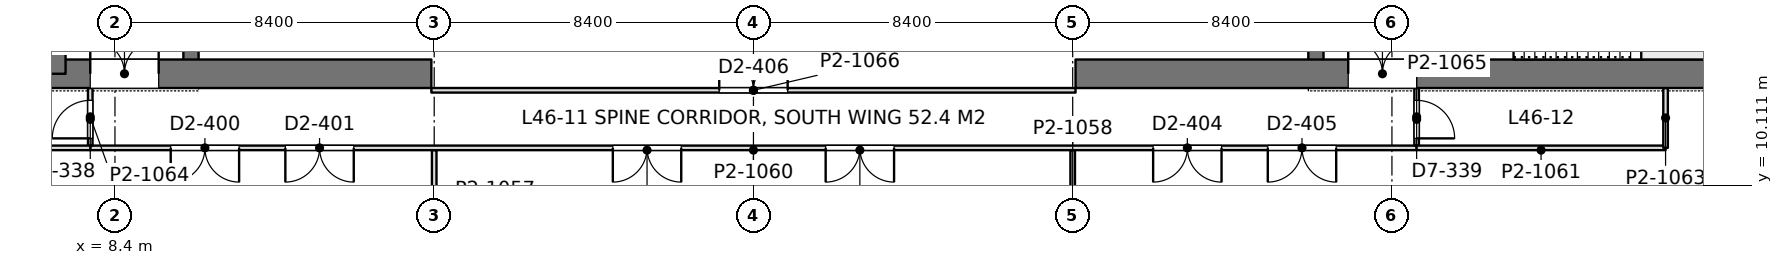
"""IFC4 building model, lengths in metres.
Left out: names, types, materials, properties, quantities, classifications, styles, units other than length and angle.
Written with IfcOpenShell. Run it as: python <this file> out.ifc"""

import sys

from ifc_helpers import new_model, si_unit, direction, frame, frame_2d, origin, place, context, subcontext, project, spatial, rectangle, extrude, element, fill, save


model = new_model("IFC4")
c1 = context("Model", 3, precision=1e-05, world=origin(), true_north=direction((0.0, 1.0)))
c2 = subcontext(c1, "Body", "Model", "MODEL_VIEW")
j1 = project(units=[si_unit("LENGTHUNIT", "METRE"), si_unit("PLANEANGLEUNIT", "RADIAN")], contexts=[c1])
p1 = place(None, origin())
s1 = spatial("IfcSite", under=j1, at=p1, CompositionType="ELEMENT")
p2 = place(p1, origin())
s2 = spatial("IfcBuilding", under=s1, at=p2, CompositionType="ELEMENT")
p3 = place(p2, frame((0.0, 0.0, 202.8)))
s3 = spatial("IfcBuildingStorey", under=s2, at=p3, CompositionType="ELEMENT", Elevation=202.8)
p4 = place(p3, frame((-1.125, 13.05, 0.0), z_axis=(0.0, 0.0, 1.0), x_axis=(1.0, 0.0, 0.0)))
e1 = element("IfcWall", 1, at=p4, inside=s3, PredefinedType="SHEAR", context=c2, shape_type="SweptSolid", body=[
    extrude(rectangle(XDim=17.85, YDim=0.75, at=frame_2d((8.925, 0.0))), origin(), (0.0, 0.0, 1.0), 4.2),
])
p5 = place(p4, frame((8.875, 0.0, 0.0)))
e2 = element("IfcOpeningElement", 2, at=p5, cuts=e1, PredefinedType="OPENING", context=c2, shape_type="SweptSolid", body=[
    extrude(rectangle(XDim=1.8, YDim=2.4, at=frame_2d((0.9, 1.2))), frame((0.0, 0.385, 0.0), z_axis=(0.0, -1.0, 0.0), x_axis=(1.0, 0.0, 0.0)), (0.0, 0.0, 1.0), 0.77),
])
p6 = place(p3, frame((6.9, 13.05, 0.0), z_axis=(0.0, 0.0, 1.0), x_axis=(0.0, 1.0, 0.0)))
e3 = element("IfcWall", 3, at=p6, inside=s3, PredefinedType="SHEAR", context=c2, shape_type="SweptSolid", body=[
    extrude(rectangle(XDim=24.3, YDim=0.4, at=frame_2d((12.15, 0.0))), origin(), (0.0, 0.0, 1.0), 4.2),
])
p7 = place(p6, frame((1.3, 0.0, 0.0)))
e4 = element("IfcOpeningElement", 4, at=p7, cuts=e3, PredefinedType="OPENING", context=c2, shape_type="SweptSolid", body=[
    extrude(rectangle(XDim=1.0, YDim=2.2, at=frame_2d((0.5, 1.1))), frame((0.0, 0.21, 0.0), z_axis=(0.0, -1.0, 0.0), x_axis=(1.0, 0.0, 0.0)), (0.0, 0.0, 1.0), 0.42),
])
p8 = place(p6, frame((22.0, 0.0, 0.0)))
e5 = element("IfcOpeningElement", 5, at=p8, cuts=e3, PredefinedType="OPENING", context=c2, shape_type="SweptSolid", body=[
    extrude(rectangle(XDim=1.0, YDim=2.2, at=frame_2d((0.5, 1.1))), frame((0.0, 0.21, 0.0), z_axis=(0.0, -1.0, 0.0), x_axis=(1.0, 0.0, 0.0)), (0.0, 0.0, 1.0), 0.42),
])
p9 = place(p6, frame((5.55, 0.0, 0.0)))
e6 = element("IfcOpeningElement", 6, at=p9, cuts=e3, PredefinedType="OPENING", context=c2, shape_type="SweptSolid", body=[
    extrude(rectangle(XDim=1.0, YDim=2.2, at=frame_2d((0.5, 1.1))), frame((0.0, 0.21, 0.0), z_axis=(0.0, -1.0, 0.0), x_axis=(1.0, 0.0, 0.0)), (0.0, 0.0, 1.0), 0.42),
])
p10 = place(p6, frame((9.55, 0.0, 0.0)))
e7 = element("IfcOpeningElement", 7, at=p10, cuts=e3, PredefinedType="OPENING", context=c2, shape_type="SweptSolid", body=[
    extrude(rectangle(XDim=1.0, YDim=2.2, at=frame_2d((0.5, 1.1))), frame((0.0, 0.21, 0.0), z_axis=(0.0, -1.0, 0.0), x_axis=(1.0, 0.0, 0.0)), (0.0, 0.0, 1.0), 0.42),
])
p11 = place(p6, frame((12.8, 0.0, 0.0)))
e8 = element("IfcOpeningElement", 8, at=p11, cuts=e3, PredefinedType="OPENING", context=c2, shape_type="SweptSolid", body=[
    extrude(rectangle(XDim=1.1, YDim=2.2, at=frame_2d((0.55, 1.1))), frame((0.0, 0.21, 0.0), z_axis=(0.0, -1.0, 0.0), x_axis=(1.0, 0.0, 0.0)), (0.0, 0.0, 1.0), 0.42),
])
p12 = place(p6, frame((15.538, 0.0, 0.0)))
e9 = element("IfcOpeningElement", 9, at=p12, cuts=e3, PredefinedType="OPENING", context=c2, shape_type="SweptSolid", body=[
    extrude(rectangle(XDim=1.1, YDim=2.2, at=frame_2d((0.55, 1.1))), frame((0.0, 0.21, 0.0), z_axis=(0.0, -1.0, 0.0), x_axis=(1.0, 0.0, 0.0)), (0.0, 0.0, 1.0), 0.42),
])
p13 = place(p6, frame((18.262, 0.0, 0.0)))
e10 = element("IfcOpeningElement", 10, at=p13, cuts=e3, PredefinedType="OPENING", context=c2, shape_type="SweptSolid", body=[
    extrude(rectangle(XDim=1.1, YDim=2.2, at=frame_2d((0.55, 1.1))), frame((0.0, 0.21, 0.0), z_axis=(0.0, -1.0, 0.0), x_axis=(1.0, 0.0, 0.0)), (0.0, 0.0, 1.0), 0.42),
])
p14 = place(p3, frame((10.4, 13.05, 0.0), z_axis=(0.0, 0.0, 1.0), x_axis=(0.0, 1.0, 0.0)))
e11 = element("IfcWall", 11, at=p14, inside=s3, PredefinedType="SHEAR", context=c2, shape_type="SweptSolid", body=[
    extrude(rectangle(XDim=24.3, YDim=0.4, at=frame_2d((12.15, 0.0))), origin(), (0.0, 0.0, 1.0), 4.2),
])
p15 = place(p14, frame((15.75, 0.0, 0.0)))
e12 = element("IfcOpeningElement", 12, at=p15, cuts=e11, PredefinedType="OPENING", context=c2, shape_type="SweptSolid", body=[
    extrude(rectangle(XDim=1.1, YDim=2.2, at=frame_2d((0.55, 1.1))), frame((0.0, 0.21, 0.0), z_axis=(0.0, -1.0, 0.0), x_axis=(1.0, 0.0, 0.0)), (0.0, 0.0, 1.0), 0.42),
])
p16 = place(p14, frame((18.6, 0.0, 0.0)))
e13 = element("IfcOpeningElement", 13, at=p16, cuts=e11, PredefinedType="OPENING", context=c2, shape_type="SweptSolid", body=[
    extrude(rectangle(XDim=1.1, YDim=2.2, at=frame_2d((0.55, 1.1))), frame((0.0, 0.21, 0.0), z_axis=(0.0, -1.0, 0.0), x_axis=(1.0, 0.0, 0.0)), (0.0, 0.0, 1.0), 0.42),
])
p17 = place(p14, frame((21.45, 0.0, 0.0)))
e14 = element("IfcOpeningElement", 14, at=p17, cuts=e11, PredefinedType="OPENING", context=c2, shape_type="SweptSolid", body=[
    extrude(rectangle(XDim=1.1, YDim=2.2, at=frame_2d((0.55, 1.1))), frame((0.0, 0.21, 0.0), z_axis=(0.0, -1.0, 0.0), x_axis=(1.0, 0.0, 0.0)), (0.0, 0.0, 1.0), 0.42),
])
p18 = place(p14, frame((8.65, 0.0, 0.0)))
e15 = element("IfcOpeningElement", 15, at=p18, cuts=e11, PredefinedType="OPENING", context=c2, shape_type="SweptSolid", body=[
    extrude(rectangle(XDim=1.8, YDim=2.4, at=frame_2d((0.9, 1.2))), frame((0.0, 0.21, 0.0), z_axis=(0.0, -1.0, 0.0), x_axis=(1.0, 0.0, 0.0)), (0.0, 0.0, 1.0), 0.42),
])
p19 = place(p3, frame((33.675, 13.05, 0.0), z_axis=(0.0, 0.0, 1.0), x_axis=(1.0, 0.0, 0.0)))
e16 = element("IfcWall", 16, at=p19, inside=s3, PredefinedType="SHEAR", context=c2, shape_type="SweptSolid", body=[
    extrude(rectangle(XDim=17.85, YDim=0.75, at=frame_2d((8.925, 0.0))), origin(), (0.0, 0.0, 1.0), 4.2),
])
p20 = place(p19, frame((7.175, 0.0, 0.0)))
e17 = element("IfcOpeningElement", 17, at=p20, cuts=e16, PredefinedType="OPENING", context=c2, shape_type="SweptSolid", body=[
    extrude(rectangle(XDim=1.8, YDim=2.4, at=frame_2d((0.9, 1.2))), frame((0.0, 0.385, 0.0), z_axis=(0.0, -1.0, 0.0), x_axis=(1.0, 0.0, 0.0)), (0.0, 0.0, 1.0), 0.77),
])
p21 = place(p3, frame((43.5, 13.05, 0.0), z_axis=(0.0, 0.0, 1.0), x_axis=(0.0, 1.0, 0.0)))
e18 = element("IfcWall", 18, at=p21, inside=s3, PredefinedType="SHEAR", context=c2, shape_type="SweptSolid", body=[
    extrude(rectangle(XDim=24.3, YDim=0.4, at=frame_2d((12.15, 0.0))), origin(), (0.0, 0.0, 1.0), 4.2),
])
p22 = place(p21, frame((1.3, 0.0, 0.0)))
e19 = element("IfcOpeningElement", 19, at=p22, cuts=e18, PredefinedType="OPENING", context=c2, shape_type="SweptSolid", body=[
    extrude(rectangle(XDim=1.0, YDim=2.2, at=frame_2d((0.5, 1.1))), frame((0.0, 0.21, 0.0), z_axis=(0.0, -1.0, 0.0), x_axis=(1.0, 0.0, 0.0)), (0.0, 0.0, 1.0), 0.42),
])
p23 = place(p21, frame((22.0, 0.0, 0.0)))
e20 = element("IfcOpeningElement", 20, at=p23, cuts=e18, PredefinedType="OPENING", context=c2, shape_type="SweptSolid", body=[
    extrude(rectangle(XDim=1.0, YDim=2.2, at=frame_2d((0.5, 1.1))), frame((0.0, 0.21, 0.0), z_axis=(0.0, -1.0, 0.0), x_axis=(1.0, 0.0, 0.0)), (0.0, 0.0, 1.0), 0.42),
])
p24 = place(p21, frame((5.55, 0.0, 0.0)))
e21 = element("IfcOpeningElement", 21, at=p24, cuts=e18, PredefinedType="OPENING", context=c2, shape_type="SweptSolid", body=[
    extrude(rectangle(XDim=1.0, YDim=2.2, at=frame_2d((0.5, 1.1))), frame((0.0, 0.21, 0.0), z_axis=(0.0, -1.0, 0.0), x_axis=(1.0, 0.0, 0.0)), (0.0, 0.0, 1.0), 0.42),
])
p25 = place(p21, frame((9.55, 0.0, 0.0)))
e22 = element("IfcOpeningElement", 22, at=p25, cuts=e18, PredefinedType="OPENING", context=c2, shape_type="SweptSolid", body=[
    extrude(rectangle(XDim=1.0, YDim=2.2, at=frame_2d((0.5, 1.1))), frame((0.0, 0.21, 0.0), z_axis=(0.0, -1.0, 0.0), x_axis=(1.0, 0.0, 0.0)), (0.0, 0.0, 1.0), 0.42),
])
p26 = place(p21, frame((12.8, 0.0, 0.0)))
e23 = element("IfcOpeningElement", 23, at=p26, cuts=e18, PredefinedType="OPENING", context=c2, shape_type="SweptSolid", body=[
    extrude(rectangle(XDim=1.1, YDim=2.2, at=frame_2d((0.55, 1.1))), frame((0.0, 0.21, 0.0), z_axis=(0.0, -1.0, 0.0), x_axis=(1.0, 0.0, 0.0)), (0.0, 0.0, 1.0), 0.42),
])
p27 = place(p21, frame((15.538, 0.0, 0.0)))
e24 = element("IfcOpeningElement", 24, at=p27, cuts=e18, PredefinedType="OPENING", context=c2, shape_type="SweptSolid", body=[
    extrude(rectangle(XDim=1.1, YDim=2.2, at=frame_2d((0.55, 1.1))), frame((0.0, 0.21, 0.0), z_axis=(0.0, -1.0, 0.0), x_axis=(1.0, 0.0, 0.0)), (0.0, 0.0, 1.0), 0.42),
])
p28 = place(p21, frame((18.262, 0.0, 0.0)))
e25 = element("IfcOpeningElement", 25, at=p28, cuts=e18, PredefinedType="OPENING", context=c2, shape_type="SweptSolid", body=[
    extrude(rectangle(XDim=1.1, YDim=2.2, at=frame_2d((0.55, 1.1))), frame((0.0, 0.21, 0.0), z_axis=(0.0, -1.0, 0.0), x_axis=(1.0, 0.0, 0.0)), (0.0, 0.0, 1.0), 0.42),
])
p29 = place(p3, frame((40.0, 13.05, 0.0), z_axis=(0.0, 0.0, 1.0), x_axis=(0.0, 1.0, 0.0)))
e26 = element("IfcWall", 26, at=p29, inside=s3, PredefinedType="SHEAR", context=c2, shape_type="SweptSolid", body=[
    extrude(rectangle(XDim=24.3, YDim=0.4, at=frame_2d((12.15, 0.0))), origin(), (0.0, 0.0, 1.0), 4.2),
])
p30 = place(p29, frame((15.75, 0.0, 0.0)))
e27 = element("IfcOpeningElement", 27, at=p30, cuts=e26, PredefinedType="OPENING", context=c2, shape_type="SweptSolid", body=[
    extrude(rectangle(XDim=1.1, YDim=2.2, at=frame_2d((0.55, 1.1))), frame((0.0, 0.21, 0.0), z_axis=(0.0, -1.0, 0.0), x_axis=(1.0, 0.0, 0.0)), (0.0, 0.0, 1.0), 0.42),
])
p31 = place(p29, frame((18.6, 0.0, 0.0)))
e28 = element("IfcOpeningElement", 28, at=p31, cuts=e26, PredefinedType="OPENING", context=c2, shape_type="SweptSolid", body=[
    extrude(rectangle(XDim=1.1, YDim=2.2, at=frame_2d((0.55, 1.1))), frame((0.0, 0.21, 0.0), z_axis=(0.0, -1.0, 0.0), x_axis=(1.0, 0.0, 0.0)), (0.0, 0.0, 1.0), 0.42),
])
p32 = place(p29, frame((21.45, 0.0, 0.0)))
e29 = element("IfcOpeningElement", 29, at=p32, cuts=e26, PredefinedType="OPENING", context=c2, shape_type="SweptSolid", body=[
    extrude(rectangle(XDim=1.1, YDim=2.2, at=frame_2d((0.55, 1.1))), frame((0.0, 0.21, 0.0), z_axis=(0.0, -1.0, 0.0), x_axis=(1.0, 0.0, 0.0)), (0.0, 0.0, 1.0), 0.42),
])
p33 = place(p29, frame((8.65, 0.0, 0.0)))
e30 = element("IfcOpeningElement", 30, at=p33, cuts=e26, PredefinedType="OPENING", context=c2, shape_type="SweptSolid", body=[
    extrude(rectangle(XDim=1.8, YDim=2.4, at=frame_2d((0.9, 1.2))), frame((0.0, 0.21, 0.0), z_axis=(0.0, -1.0, 0.0), x_axis=(1.0, 0.0, 0.0)), (0.0, 0.0, 1.0), 0.42),
])
for number, where, z_axis, x_axis in (
    (31, (16.8, 8.949, 0.0), (0.0, 0.0, 1.0), (0.0, 1.0, 0.0)),
    (32, (33.6, 8.949, 0.0), (0.0, 0.0, 1.0), (0.0, 1.0, 0.0)),
):
    element("IfcWall", number, at=place(p3, frame(where, z_axis=z_axis, x_axis=x_axis)), inside=s3, PredefinedType="PARTITIONING", context=c2, shape_type="SweptSolid", body=[
        extrude(rectangle(XDim=2.093, YDim=0.12, at=frame_2d((1.046, 0.0))), origin(), (0.0, 0.0, 1.0), 3.69),
    ])
p34 = place(p3, frame((7.748, 11.1, 0.0), z_axis=(0.0, 0.0, 1.0), x_axis=(1.0, 0.0, 0.0)))
e33 = element("IfcWall", 33, at=p34, inside=s3, PredefinedType="PARTITIONING", context=c2, shape_type="SweptSolid", body=[
    extrude(rectangle(XDim=34.904, YDim=0.12, at=frame_2d((17.452, 0.0))), origin(), (0.0, 0.0, 1.0), 3.55),
])
p35 = place(p34, frame((2.119, 0.0, 0.0)))
e34 = element("IfcOpeningElement", 34, at=p35, cuts=e33, PredefinedType="OPENING", context=c2, shape_type="SweptSolid", body=[
    extrude(rectangle(XDim=1.8, YDim=2.2, at=frame_2d((0.9, 1.1))), frame((0.0, 0.07, 0.0), z_axis=(0.0, -1.0, 0.0), x_axis=(1.0, 0.0, 0.0)), (0.0, 0.0, 1.0), 0.14),
])
p36 = place(p34, frame((5.135, 0.0, 0.0)))
e35 = element("IfcOpeningElement", 35, at=p36, cuts=e33, PredefinedType="OPENING", context=c2, shape_type="SweptSolid", body=[
    extrude(rectangle(XDim=1.8, YDim=2.2, at=frame_2d((0.9, 1.1))), frame((0.0, 0.07, 0.0), z_axis=(0.0, -1.0, 0.0), x_axis=(1.0, 0.0, 0.0)), (0.0, 0.0, 1.0), 0.14),
])
p37 = place(p34, frame((13.752, 0.0, 0.0)))
e36 = element("IfcOpeningElement", 36, at=p37, cuts=e33, PredefinedType="OPENING", context=c2, shape_type="SweptSolid", body=[
    extrude(rectangle(XDim=1.8, YDim=2.2, at=frame_2d((0.9, 1.1))), frame((0.0, 0.07, 0.0), z_axis=(0.0, -1.0, 0.0), x_axis=(1.0, 0.0, 0.0)), (0.0, 0.0, 1.0), 0.14),
])
p38 = place(p34, frame((19.352, 0.0, 0.0)))
e37 = element("IfcOpeningElement", 37, at=p38, cuts=e33, PredefinedType="OPENING", context=c2, shape_type="SweptSolid", body=[
    extrude(rectangle(XDim=1.8, YDim=2.2, at=frame_2d((0.9, 1.1))), frame((0.0, 0.07, 0.0), z_axis=(0.0, -1.0, 0.0), x_axis=(1.0, 0.0, 0.0)), (0.0, 0.0, 1.0), 0.14),
])
p39 = place(p34, frame((27.969, 0.0, 0.0)))
e38 = element("IfcOpeningElement", 38, at=p39, cuts=e33, PredefinedType="OPENING", context=c2, shape_type="SweptSolid", body=[
    extrude(rectangle(XDim=1.8, YDim=2.2, at=frame_2d((0.9, 1.1))), frame((0.0, 0.07, 0.0), z_axis=(0.0, -1.0, 0.0), x_axis=(1.0, 0.0, 0.0)), (0.0, 0.0, 1.0), 0.14),
])
p40 = place(p34, frame((30.985, 0.0, 0.0)))
e39 = element("IfcOpeningElement", 39, at=p40, cuts=e33, PredefinedType="OPENING", context=c2, shape_type="SweptSolid", body=[
    extrude(rectangle(XDim=1.8, YDim=2.2, at=frame_2d((0.9, 1.1))), frame((0.0, 0.07, 0.0), z_axis=(0.0, -1.0, 0.0), x_axis=(1.0, 0.0, 0.0)), (0.0, 0.0, 1.0), 0.14),
])
p41 = place(p3, frame((7.75, 11.158, 0.0), z_axis=(0.0, 0.0, 1.0), x_axis=(0.0, 1.0, 0.0)))
e40 = element("IfcWall", 40, at=p41, inside=s3, PredefinedType="PARTITIONING", context=c2, shape_type="SweptSolid", body=[
    extrude(rectangle(XDim=1.518, YDim=0.12, at=frame_2d((0.759, 0.0))), origin(), (0.0, 0.0, 1.0), 4.05),
])
p42 = place(p41, frame((0.192, 0.0, 0.0)))
e41 = element("IfcOpeningElement", 41, at=p42, cuts=e40, PredefinedType="OPENING", context=c2, shape_type="SweptSolid", body=[
    extrude(rectangle(XDim=1.0, YDim=2.4, at=frame_2d((0.5, 1.2))), frame((0.0, 0.07, 0.0), z_axis=(0.0, -1.0, 0.0), x_axis=(1.0, 0.0, 0.0)), (0.0, 0.0, 1.0), 0.14),
])
p43 = place(p3, frame((42.65, 11.158, 0.0), z_axis=(0.0, 0.0, 1.0), x_axis=(0.0, 1.0, 0.0)))
e42 = element("IfcWall", 42, at=p43, inside=s3, PredefinedType="PARTITIONING", context=c2, shape_type="SweptSolid", body=[
    extrude(rectangle(XDim=1.518, YDim=0.12, at=frame_2d((0.759, 0.0))), origin(), (0.0, 0.0, 1.0), 4.05),
])
p44 = place(p43, frame((0.192, 0.0, 0.0)))
e43 = element("IfcOpeningElement", 43, at=p44, cuts=e42, PredefinedType="OPENING", context=c2, shape_type="SweptSolid", body=[
    extrude(rectangle(XDim=1.0, YDim=2.4, at=frame_2d((0.5, 1.2))), frame((0.0, 0.07, 0.0), z_axis=(0.0, -1.0, 0.0), x_axis=(1.0, 0.0, 0.0)), (0.0, 0.0, 1.0), 0.14),
])
for number, where, z_axis, x_axis in (
    (44, (1.2, 11.1, 0.0), (0.0, 0.0, 1.0), (1.0, 0.0, 0.0)),
    (45, (42.648, 11.1, 0.0), (0.0, 0.0, 1.0), (1.0, 0.0, 0.0)),
):
    element("IfcWall", number, at=place(p3, frame(where, z_axis=z_axis, x_axis=x_axis)), inside=s3, PredefinedType="PARTITIONING", context=c2, shape_type="SweptSolid", body=[
        extrude(rectangle(XDim=6.552, YDim=0.12, at=frame_2d((3.276, 0.0))), origin(), (0.0, 0.0, 1.0), 4.05),
    ])
p45 = place(p3, frame((49.2, 11.1, 0.0), z_axis=(0.0, 0.0, 1.0), x_axis=(0.0, 1.0, 0.0)))
e46 = element("IfcWall", 46, at=p45, inside=s3, PredefinedType="PARTITIONING", context=c2, shape_type="SweptSolid", body=[
    extrude(rectangle(XDim=1.576, YDim=0.12, at=frame_2d((0.788, 0.0))), origin(), (0.0, 0.0, 1.0), 4.05),
])
p46 = place(p3, frame((16.725, 12.615, 0.0), z_axis=(0.0, 0.0, 1.0), x_axis=(1.0, 0.0, 0.0)))
e47 = element("IfcWall", 47, at=p46, inside=s3, PredefinedType="PARTITIONING", context=c2, shape_type="SweptSolid", body=[
    extrude(rectangle(XDim=16.95, YDim=0.12, at=frame_2d((8.475, 0.0))), origin(), (0.0, 0.0, 1.0), 3.55),
])
p47 = place(p46, frame((7.575, 0.0, 0.0)))
e48 = element("IfcOpeningElement", 48, at=p47, cuts=e47, PredefinedType="OPENING", context=c2, shape_type="SweptSolid", body=[
    extrude(rectangle(XDim=1.8, YDim=2.2, at=frame_2d((0.9, 1.1))), frame((0.0, 0.07, 0.0), z_axis=(0.0, -1.0, 0.0), x_axis=(1.0, 0.0, 0.0)), (0.0, 0.0, 1.0), 0.14),
])
p48 = place(p5, origin())
e49 = element("IfcDoor", 49, at=p48, inside=s3, OperationType="DOUBLE_DOOR_SINGLE_SWING", PredefinedType="DOOR", context=c2, shape_type="SweptSolid", body=[
    extrude(rectangle(XDim=1.8, YDim=2.4, at=frame_2d((0.9, 1.2))), frame((0.0, 0.025, 0.0), z_axis=(0.0, -1.0, 0.0), x_axis=(1.0, 0.0, 0.0)), (0.0, 0.0, 1.0), 0.05),
])
fill(e2, e49)
p49 = place(p20, origin())
e50 = element("IfcDoor", 50, at=p49, inside=s3, OperationType="DOUBLE_DOOR_SINGLE_SWING", PredefinedType="DOOR", context=c2, shape_type="SweptSolid", body=[
    extrude(rectangle(XDim=1.8, YDim=2.4, at=frame_2d((0.9, 1.2))), frame((0.0, 0.025, 0.0), z_axis=(0.0, -1.0, 0.0), x_axis=(1.0, 0.0, 0.0)), (0.0, 0.0, 1.0), 0.05),
])
fill(e17, e50)
p50 = place(p35, frame((1.8, 0.0, 0.0), z_axis=(0.0, 0.0, 1.0), x_axis=(-1.0, 0.0, 0.0)))
e51 = element("IfcDoor", 51, at=p50, inside=s3, OperationType="DOUBLE_DOOR_SINGLE_SWING", PredefinedType="DOOR", context=c2, shape_type="SweptSolid", body=[
    extrude(rectangle(XDim=1.8, YDim=2.2, at=frame_2d((0.9, 1.1))), frame((0.0, 0.025, 0.0), z_axis=(0.0, -1.0, 0.0), x_axis=(1.0, 0.0, 0.0)), (0.0, 0.0, 1.0), 0.05),
])
fill(e34, e51)
p51 = place(p36, frame((1.8, 0.0, 0.0), z_axis=(0.0, 0.0, 1.0), x_axis=(-1.0, 0.0, 0.0)))
e52 = element("IfcDoor", 52, at=p51, inside=s3, OperationType="DOUBLE_DOOR_SINGLE_SWING", PredefinedType="DOOR", context=c2, shape_type="SweptSolid", body=[
    extrude(rectangle(XDim=1.8, YDim=2.2, at=frame_2d((0.9, 1.1))), frame((0.0, 0.025, 0.0), z_axis=(0.0, -1.0, 0.0), x_axis=(1.0, 0.0, 0.0)), (0.0, 0.0, 1.0), 0.05),
])
fill(e35, e52)
p52 = place(p37, frame((1.8, 0.0, 0.0), z_axis=(0.0, 0.0, 1.0), x_axis=(-1.0, 0.0, 0.0)))
e53 = element("IfcDoor", 53, at=p52, inside=s3, OperationType="DOUBLE_DOOR_SINGLE_SWING", PredefinedType="DOOR", context=c2, shape_type="SweptSolid", body=[
    extrude(rectangle(XDim=1.8, YDim=2.2, at=frame_2d((0.9, 1.1))), frame((0.0, 0.025, 0.0), z_axis=(0.0, -1.0, 0.0), x_axis=(1.0, 0.0, 0.0)), (0.0, 0.0, 1.0), 0.05),
])
fill(e36, e53)
p53 = place(p38, frame((1.8, 0.0, 0.0), z_axis=(0.0, 0.0, 1.0), x_axis=(-1.0, 0.0, 0.0)))
e54 = element("IfcDoor", 54, at=p53, inside=s3, OperationType="DOUBLE_DOOR_SINGLE_SWING", PredefinedType="DOOR", context=c2, shape_type="SweptSolid", body=[
    extrude(rectangle(XDim=1.8, YDim=2.2, at=frame_2d((0.9, 1.1))), frame((0.0, 0.025, 0.0), z_axis=(0.0, -1.0, 0.0), x_axis=(1.0, 0.0, 0.0)), (0.0, 0.0, 1.0), 0.05),
])
fill(e37, e54)
p54 = place(p39, frame((1.8, 0.0, 0.0), z_axis=(0.0, 0.0, 1.0), x_axis=(-1.0, 0.0, 0.0)))
e55 = element("IfcDoor", 55, at=p54, inside=s3, OperationType="DOUBLE_DOOR_SINGLE_SWING", PredefinedType="DOOR", context=c2, shape_type="SweptSolid", body=[
    extrude(rectangle(XDim=1.8, YDim=2.2, at=frame_2d((0.9, 1.1))), frame((0.0, 0.025, 0.0), z_axis=(0.0, -1.0, 0.0), x_axis=(1.0, 0.0, 0.0)), (0.0, 0.0, 1.0), 0.05),
])
fill(e38, e55)
p55 = place(p40, frame((1.8, 0.0, 0.0), z_axis=(0.0, 0.0, 1.0), x_axis=(-1.0, 0.0, 0.0)))
e56 = element("IfcDoor", 56, at=p55, inside=s3, OperationType="DOUBLE_DOOR_SINGLE_SWING", PredefinedType="DOOR", context=c2, shape_type="SweptSolid", body=[
    extrude(rectangle(XDim=1.8, YDim=2.2, at=frame_2d((0.9, 1.1))), frame((0.0, 0.025, 0.0), z_axis=(0.0, -1.0, 0.0), x_axis=(1.0, 0.0, 0.0)), (0.0, 0.0, 1.0), 0.05),
])
fill(e39, e56)
p56 = place(p42, origin())
e57 = element("IfcDoor", 57, at=p56, inside=s3, OperationType="SINGLE_SWING_LEFT", PredefinedType="DOOR", context=c2, shape_type="SweptSolid", body=[
    extrude(rectangle(XDim=1.0, YDim=2.4, at=frame_2d((0.5, 1.2))), frame((0.0, 0.025, 0.0), z_axis=(0.0, -1.0, 0.0), x_axis=(1.0, 0.0, 0.0)), (0.0, 0.0, 1.0), 0.05),
])
fill(e41, e57)
p57 = place(p44, frame((1.0, 0.0, 0.0), z_axis=(0.0, 0.0, 1.0), x_axis=(-1.0, 0.0, 0.0)))
e58 = element("IfcDoor", 58, at=p57, inside=s3, OperationType="SINGLE_SWING_RIGHT", PredefinedType="DOOR", context=c2, shape_type="SweptSolid", body=[
    extrude(rectangle(XDim=1.0, YDim=2.4, at=frame_2d((0.5, 1.2))), frame((0.0, 0.025, 0.0), z_axis=(0.0, -1.0, 0.0), x_axis=(1.0, 0.0, 0.0)), (0.0, 0.0, 1.0), 0.05),
])
fill(e43, e58)
p58 = place(p47, origin())
e59 = element("IfcDoor", 59, at=p58, inside=s3, OperationType="DOUBLE_DOOR_SINGLE_SWING", PredefinedType="DOOR", context=c2, shape_type="SweptSolid", body=[
    extrude(rectangle(XDim=1.8, YDim=2.2, at=frame_2d((0.9, 1.1))), frame((0.0, 0.025, 0.0), z_axis=(0.0, -1.0, 0.0), x_axis=(1.0, 0.0, 0.0)), (0.0, 0.0, 1.0), 0.05),
])
fill(e48, e59)
save(model, sys.argv[1])
